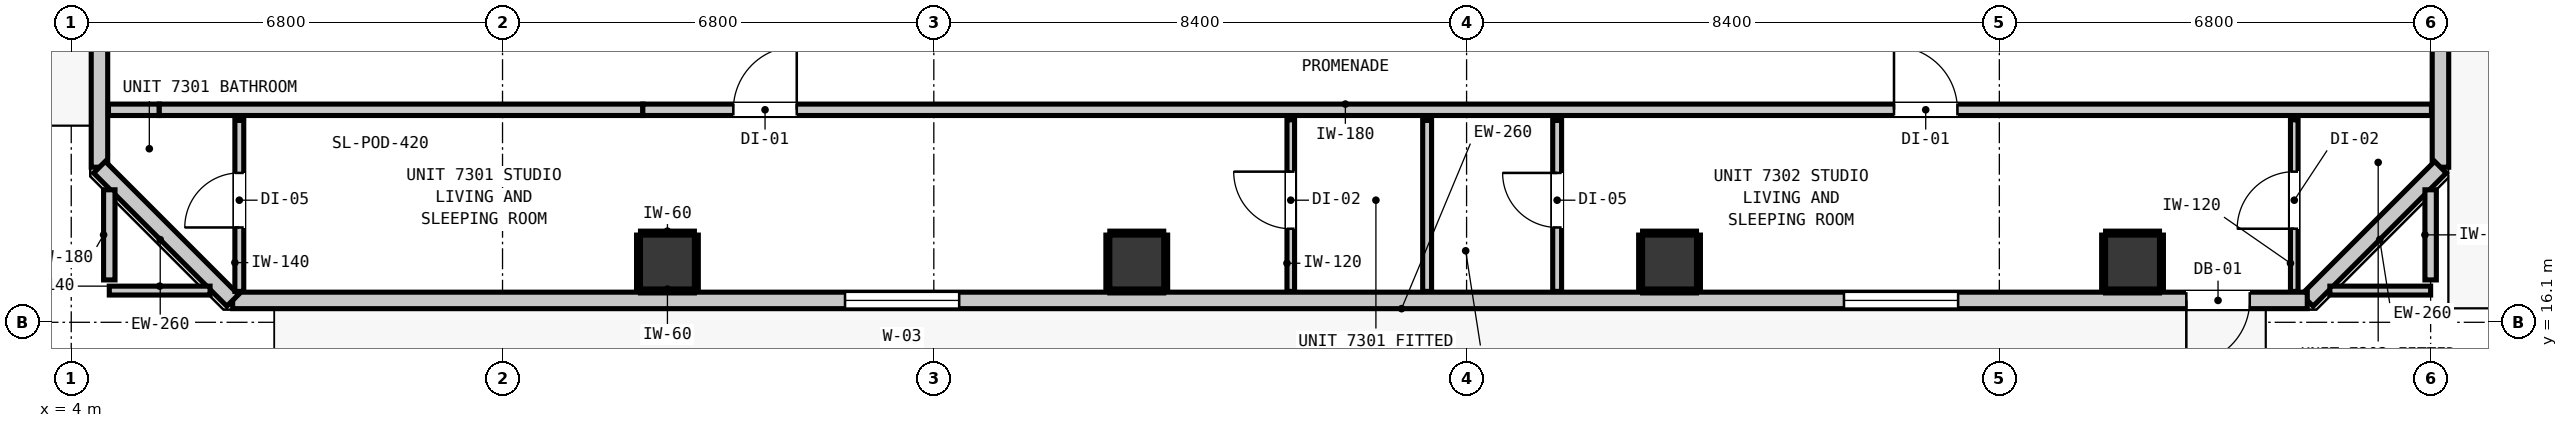
"""IFC4 building model, lengths in metres.
Left out: names, types, materials, properties, quantities, classifications, styles, units other than length and angle.
Written with IfcOpenShell. Run it as: python <this file> out.ifc"""

import sys

from ifc_helpers import new_model, si_unit, direction, frame, frame_2d, origin, origin_2d, place, context, subcontext, project, spatial, rectangle, extrude, element, fill, save


model = new_model("IFC4")
c1 = context("Model", 3, precision=1e-05, world=origin(), true_north=direction((0.0, 1.0)))
c2 = subcontext(c1, "Body", "Model", "MODEL_VIEW")
j1 = project(units=[si_unit("LENGTHUNIT", "METRE"), si_unit("PLANEANGLEUNIT", "RADIAN")], contexts=[c1])
p1 = place(None, origin())
s1 = spatial("IfcSite", under=j1, at=p1, CompositionType="ELEMENT")
p2 = place(p1, origin())
s2 = spatial("IfcBuilding", under=s1, at=p2, CompositionType="ELEMENT")
p3 = place(p2, frame((0.0, 0.0, 251.2)))
s3 = spatial("IfcBuildingStorey", under=s2, at=p3, CompositionType="ELEMENT", Elevation=251.2)
for number, where, z_axis, x_axis in (
    (1, (13.4, 17.05, -0.2), (0.0, 0.0, 1.0), (1.0, 0.0, 0.0)),
    (2, (20.8, 17.05, -0.2), (0.0, 0.0, 1.0), (1.0, 0.0, 0.0)),
    (3, (29.2, 17.05, -0.2), (0.0, 0.0, 1.0), (1.0, 0.0, 0.0)),
    (4, (36.5, 17.05, -0.2), (0.0, 0.0, 1.0), (1.0, 0.0, 0.0)),
):
    element("IfcColumn", number, at=place(p3, frame(where, z_axis=z_axis, x_axis=x_axis)), inside=s3, PredefinedType="COLUMN", context=c2, shape_type="SweptSolid", body=[
        extrude(rectangle(XDim=0.85, YDim=0.85, at=origin_2d()), origin(), (0.0, 0.0, 1.0), 3.52),
    ])
p4 = place(p3, frame((4.445, 18.545, 0.0), z_axis=(0.0, 0.0, 1.0), x_axis=(0.0, 1.0, 0.0)))
e5 = element("IfcWall", 5, at=p4, inside=s3, PredefinedType="STANDARD", context=c2, shape_type="SweptSolid", body=[
    extrude(rectangle(XDim=30.31, YDim=0.26, at=frame_2d((15.155, 0.0))), origin(), (0.0, 0.0, 1.0), 3.1),
])
p5 = place(p4, frame((4.434, 0.0, 0.0)))
e6 = element("IfcOpeningElement", 6, at=p5, cuts=e5, PredefinedType="OPENING", context=c2, shape_type="SweptSolid", body=[
    extrude(rectangle(XDim=1.0, YDim=2.15, at=frame_2d((0.5, 1.075))), frame((0.0, 0.14, 0.0), z_axis=(0.0, -1.0, 0.0), x_axis=(1.0, 0.0, 0.0)), (0.0, 0.0, 1.0), 0.28),
])
p6 = place(p4, frame((27.866, 0.0, 0.85)))
e7 = element("IfcOpeningElement", 7, at=p6, cuts=e5, PredefinedType="OPENING", context=c2, shape_type="SweptSolid", body=[
    extrude(rectangle(XDim=1.8, YDim=1.9, at=frame_2d((0.9, 0.95))), frame((0.0, 0.14, 0.0), z_axis=(0.0, -1.0, 0.0), x_axis=(1.0, 0.0, 0.0)), (0.0, 0.0, 1.0), 0.28),
])
p7 = place(p3, frame((41.355, 48.855, 0.0), z_axis=(0.0, 0.0, 1.0), x_axis=(0.0, -1.0, 0.0)))
e8 = element("IfcWall", 8, at=p7, inside=s3, PredefinedType="STANDARD", context=c2, shape_type="SweptSolid", body=[
    extrude(rectangle(XDim=30.31, YDim=0.26, at=frame_2d((15.155, 0.0))), origin(), (0.0, 0.0, 1.0), 3.1),
])
p8 = place(p7, frame((0.507, 0.0, 0.0)))
e9 = element("IfcOpeningElement", 9, at=p8, cuts=e8, PredefinedType="OPENING", context=c2, shape_type="SweptSolid", body=[
    extrude(rectangle(XDim=1.1, YDim=2.15, at=frame_2d((0.55, 1.075))), frame((0.0, 0.14, 0.0), z_axis=(0.0, -1.0, 0.0), x_axis=(1.0, 0.0, 0.0)), (0.0, 0.0, 1.0), 0.28),
])
p9 = place(p7, frame((3.406, 0.0, 0.85)))
e10 = element("IfcOpeningElement", 10, at=p9, cuts=e8, PredefinedType="OPENING", context=c2, shape_type="SweptSolid", body=[
    extrude(rectangle(XDim=1.8, YDim=1.9, at=frame_2d((0.9, 0.95))), frame((0.0, 0.14, 0.0), z_axis=(0.0, -1.0, 0.0), x_axis=(1.0, 0.0, 0.0)), (0.0, 0.0, 1.0), 0.28),
])
p10 = place(p3, frame((41.355, 18.545, 0.0), z_axis=(0.0, 0.0, 1.0), x_axis=(-0.707147883682, -0.707065676302, 0.0)))
e11 = element("IfcWall", 11, at=p10, inside=s3, PredefinedType="STANDARD", context=c2, shape_type="SweptSolid", body=[
    extrude(rectangle(XDim=2.97, YDim=0.26, at=frame_2d((1.485, 0.0))), origin(), (0.0, 0.0, 1.0), 3.1),
])
p11 = place(p3, frame((39.255, 16.445, 0.0), z_axis=(0.0, 0.0, 1.0), x_axis=(-1.0, 0.0, 0.0)))
e12 = element("IfcWall", 12, at=p11, inside=s3, PredefinedType="STANDARD", context=c2, shape_type="SweptSolid", body=[
    extrude(rectangle(XDim=32.71, YDim=0.26, at=frame_2d((16.355, 0.0))), origin(), (0.0, 0.0, 1.0), 3.1),
])
p12 = place(p11, frame((0.907, 0.0, 0.0)))
e13 = element("IfcOpeningElement", 13, at=p12, cuts=e12, PredefinedType="OPENING", context=c2, shape_type="SweptSolid", body=[
    extrude(rectangle(XDim=1.0, YDim=2.15, at=frame_2d((0.5, 1.075))), frame((0.0, 0.14, 0.0), z_axis=(0.0, -1.0, 0.0), x_axis=(1.0, 0.0, 0.0)), (0.0, 0.0, 1.0), 0.28),
])
p13 = place(p11, frame((21.255, 0.0, 0.85)))
e14 = element("IfcOpeningElement", 14, at=p13, cuts=e12, PredefinedType="OPENING", context=c2, shape_type="SweptSolid", body=[
    extrude(rectangle(XDim=1.8, YDim=1.9, at=frame_2d((0.9, 0.95))), frame((0.0, 0.14, 0.0), z_axis=(0.0, -1.0, 0.0), x_axis=(1.0, 0.0, 0.0)), (0.0, 0.0, 1.0), 0.28),
])
p14 = place(p11, frame((5.505, 0.0, 0.85)))
e15 = element("IfcOpeningElement", 15, at=p14, cuts=e12, PredefinedType="OPENING", context=c2, shape_type="SweptSolid", body=[
    extrude(rectangle(XDim=1.8, YDim=1.9, at=frame_2d((0.9, 0.95))), frame((0.0, 0.14, 0.0), z_axis=(0.0, -1.0, 0.0), x_axis=(1.0, 0.0, 0.0)), (0.0, 0.0, 1.0), 0.28),
])
p15 = place(p3, frame((6.545, 16.445, 0.0), z_axis=(0.0, 0.0, 1.0), x_axis=(-0.707106781187, 0.707106781187, 0.0)))
e16 = element("IfcWall", 16, at=p15, inside=s3, PredefinedType="STANDARD", context=c2, shape_type="SweptSolid", body=[
    extrude(rectangle(XDim=2.97, YDim=0.26, at=frame_2d((1.485, 0.0))), origin(), (0.0, 0.0, 1.0), 3.1),
])
p16 = place(p3, frame((4.587, 19.45, 0.0), z_axis=(0.0, 0.0, 1.0), x_axis=(1.0, 0.0, 0.0)))
e17 = element("IfcWall", 17, at=p16, inside=s3, PredefinedType="PARTITIONING", context=c2, shape_type="SweptSolid", body=[
    extrude(rectangle(XDim=0.801, YDim=0.18, at=frame_2d((0.4, 0.0))), origin(), (0.0, 0.0, 1.0), 3.1),
])
p17 = place(p3, frame((5.388, 19.45, 0.0), z_axis=(0.0, 0.0, 1.0), x_axis=(1.0, 0.0, 0.0)))
e18 = element("IfcWall", 18, at=p17, inside=s3, PredefinedType="PARTITIONING", context=c2, shape_type="SweptSolid", body=[
    extrude(rectangle(XDim=7.624, YDim=0.18, at=frame_2d((3.812, 0.0))), origin(), (0.0, 0.0, 1.0), 2.477),
])
p18 = place(p3, frame((13.012, 19.45, 0.0), z_axis=(0.0, 0.0, 1.0), x_axis=(1.0, 0.0, 0.0)))
e19 = element("IfcWall", 19, at=p18, inside=s3, PredefinedType="PARTITIONING", context=c2, shape_type="SweptSolid", body=[
    extrude(rectangle(XDim=28.201, YDim=0.18, at=frame_2d((14.101, 0.0))), origin(), (0.0, 0.0, 1.0), 3.1),
])
p19 = place(p18, frame((1.427, 0.0, 0.0)))
e20 = element("IfcOpeningElement", 20, at=p19, cuts=e19, PredefinedType="OPENING", context=c2, shape_type="SweptSolid", body=[
    extrude(rectangle(XDim=1.0, YDim=2.15, at=frame_2d((0.5, 1.075))), frame((0.0, 0.1, 0.0), z_axis=(0.0, -1.0, 0.0), x_axis=(1.0, 0.0, 0.0)), (0.0, 0.0, 1.0), 0.2),
])
p20 = place(p18, frame((19.727, 0.0, 0.0)))
e21 = element("IfcOpeningElement", 21, at=p20, cuts=e19, PredefinedType="OPENING", context=c2, shape_type="SweptSolid", body=[
    extrude(rectangle(XDim=1.0, YDim=2.15, at=frame_2d((0.5, 1.075))), frame((0.0, 0.1, 0.0), z_axis=(0.0, -1.0, 0.0), x_axis=(1.0, 0.0, 0.0)), (0.0, 0.0, 1.0), 0.2),
])
for number, where, z_axis, x_axis in (
    (22, (4.6, 16.6, 0.0), (0.0, 0.0, 1.0), (1.0, 0.0, 0.0)),
    (23, (39.611, 16.6, 0.0), (0.0, 0.0, 1.0), (1.0, 0.0, 0.0)),
):
    element("IfcWall", number, at=place(p3, frame(where, z_axis=z_axis, x_axis=x_axis)), inside=s3, PredefinedType="PARTITIONING", context=c2, shape_type="SweptSolid", body=[
        extrude(rectangle(XDim=1.589, YDim=0.14, at=frame_2d((0.794, 0.0))), origin(), (0.0, 0.0, 1.0), 3.1),
    ])
for number, where, z_axis, x_axis in (
    (24, (4.6, 16.768, 0.0), (0.0, 0.0, 1.0), (0.0, 1.0, 0.0)),
    (25, (41.2, 16.768, 0.0), (0.0, 0.0, 1.0), (0.0, 1.0, 0.0)),
):
    element("IfcWall", number, at=place(p3, frame(where, z_axis=z_axis, x_axis=x_axis)), inside=s3, PredefinedType="PARTITIONING", context=c2, shape_type="SweptSolid", body=[
        extrude(rectangle(XDim=1.421, YDim=0.18, at=frame_2d((0.71, 0.0))), origin(), (0.0, 0.0, 1.0), 3.1),
    ])
p21 = place(p3, frame((6.65, 16.587, 0.0), z_axis=(0.0, 0.0, 1.0), x_axis=(0.0, 1.0, 0.0)))
e26 = element("IfcWall", 26, at=p21, inside=s3, PredefinedType="PARTITIONING", context=c2, shape_type="SweptSolid", body=[
    extrude(rectangle(XDim=2.695, YDim=0.14, at=frame_2d((1.348, 0.0))), origin(), (0.0, 0.0, 1.0), 3.1),
])
p22 = place(p21, frame((1.008, 0.0, 0.0)))
e27 = element("IfcOpeningElement", 27, at=p22, cuts=e26, PredefinedType="OPENING", context=c2, shape_type="SweptSolid", body=[
    extrude(rectangle(XDim=0.86, YDim=2.02, at=frame_2d((0.43, 1.01))), frame((0.0, 0.08, 0.0), z_axis=(0.0, -1.0, 0.0), x_axis=(1.0, 0.0, 0.0)), (0.0, 0.0, 1.0), 0.16),
])
p23 = place(p3, frame((25.378, 16.587, 0.0), z_axis=(0.0, 0.0, 1.0), x_axis=(0.0, 1.0, 0.0)))
e28 = element("IfcWall", 28, at=p23, inside=s3, PredefinedType="PARTITIONING", context=c2, shape_type="SweptSolid", body=[
    extrude(rectangle(XDim=2.695, YDim=0.14, at=frame_2d((1.348, 0.0))), origin(), (0.0, 0.0, 1.0), 3.1),
])
p24 = place(p3, frame((27.428, 16.587, 0.0), z_axis=(0.0, 0.0, 1.0), x_axis=(0.0, 1.0, 0.0)))
e29 = element("IfcWall", 29, at=p24, inside=s3, PredefinedType="PARTITIONING", context=c2, shape_type="SweptSolid", body=[
    extrude(rectangle(XDim=2.695, YDim=0.14, at=frame_2d((1.348, 0.0))), origin(), (0.0, 0.0, 1.0), 3.1),
])
p25 = place(p24, frame((1.008, 0.0, 0.0)))
e30 = element("IfcOpeningElement", 30, at=p25, cuts=e29, PredefinedType="OPENING", context=c2, shape_type="SweptSolid", body=[
    extrude(rectangle(XDim=0.86, YDim=2.02, at=frame_2d((0.43, 1.01))), frame((0.0, 0.08, 0.0), z_axis=(0.0, -1.0, 0.0), x_axis=(1.0, 0.0, 0.0)), (0.0, 0.0, 1.0), 0.16),
])
p26 = place(p3, frame((23.228, 16.587, 0.0), z_axis=(0.0, 0.0, 1.0), x_axis=(0.0, 1.0, 0.0)))
e31 = element("IfcWall", 31, at=p26, inside=s3, PredefinedType="PARTITIONING", context=c2, shape_type="SweptSolid", body=[
    extrude(rectangle(XDim=2.705, YDim=0.12, at=frame_2d((1.353, 0.0))), origin(), (0.0, 0.0, 1.0), 3.1),
])
p27 = place(p26, frame((0.988, 0.0, 0.0)))
e32 = element("IfcOpeningElement", 32, at=p27, cuts=e31, PredefinedType="OPENING", context=c2, shape_type="SweptSolid", body=[
    extrude(rectangle(XDim=0.9, YDim=2.1, at=frame_2d((0.45, 1.05))), frame((0.0, 0.07, 0.0), z_axis=(0.0, -1.0, 0.0), x_axis=(1.0, 0.0, 0.0)), (0.0, 0.0, 1.0), 0.14),
])
p28 = place(p3, frame((39.05, 16.587, 0.0), z_axis=(0.0, 0.0, 1.0), x_axis=(0.0, 1.0, 0.0)))
e33 = element("IfcWall", 33, at=p28, inside=s3, PredefinedType="PARTITIONING", context=c2, shape_type="SweptSolid", body=[
    extrude(rectangle(XDim=2.705, YDim=0.12, at=frame_2d((1.353, 0.0))), origin(), (0.0, 0.0, 1.0), 3.1),
])
p29 = place(p28, frame((0.988, 0.0, 0.0)))
e34 = element("IfcOpeningElement", 34, at=p29, cuts=e33, PredefinedType="OPENING", context=c2, shape_type="SweptSolid", body=[
    extrude(rectangle(XDim=0.9, YDim=2.1, at=frame_2d((0.45, 1.05))), frame((0.0, 0.07, 0.0), z_axis=(0.0, -1.0, 0.0), x_axis=(1.0, 0.0, 0.0)), (0.0, 0.0, 1.0), 0.14),
])
for number, where, z_axis, x_axis in (
    (35, (12.975, 16.593, 0.0), (0.0, 0.0, 1.0), (1.0, 0.0, 0.0)),
    (36, (12.975, 17.507, 0.0), (0.0, 0.0, 1.0), (1.0, 0.0, 0.0)),
):
    element("IfcWall", number, at=place(p3, frame(where, z_axis=z_axis, x_axis=x_axis)), inside=s3, PredefinedType="PARTITIONING", context=c2, shape_type="SweptSolid", body=[
        extrude(rectangle(XDim=0.85, YDim=0.06, at=frame_2d((0.425, 0.0))), origin(), (0.0, 0.0, 1.0), 1.45),
    ])
for number, where, z_axis, x_axis in (
    (37, (12.943, 16.625, 0.0), (0.0, 0.0, 1.0), (0.0, 1.0, 0.0)),
    (38, (13.857, 16.625, 0.0), (0.0, 0.0, 1.0), (0.0, 1.0, 0.0)),
    (39, (20.375, 16.593, 0.0), (0.0, 0.0, 1.0), (1.0, 0.0, 0.0)),
    (40, (20.375, 17.507, 0.0), (0.0, 0.0, 1.0), (1.0, 0.0, 0.0)),
    (41, (20.343, 16.625, 0.0), (0.0, 0.0, 1.0), (0.0, 1.0, 0.0)),
    (42, (21.257, 16.625, 0.0), (0.0, 0.0, 1.0), (0.0, 1.0, 0.0)),
    (43, (28.775, 16.593, 0.0), (0.0, 0.0, 1.0), (1.0, 0.0, 0.0)),
    (44, (28.775, 17.507, 0.0), (0.0, 0.0, 1.0), (1.0, 0.0, 0.0)),
    (45, (28.743, 16.625, 0.0), (0.0, 0.0, 1.0), (0.0, 1.0, 0.0)),
    (46, (29.657, 16.625, 0.0), (0.0, 0.0, 1.0), (0.0, 1.0, 0.0)),
    (47, (36.075, 16.593, 0.0), (0.0, 0.0, 1.0), (1.0, 0.0, 0.0)),
    (48, (36.075, 17.507, 0.0), (0.0, 0.0, 1.0), (1.0, 0.0, 0.0)),
    (49, (36.043, 16.625, 0.0), (0.0, 0.0, 1.0), (0.0, 1.0, 0.0)),
    (50, (36.957, 16.625, 0.0), (0.0, 0.0, 1.0), (0.0, 1.0, 0.0)),
):
    element("IfcWall", number, at=place(p3, frame(where, z_axis=z_axis, x_axis=x_axis)), inside=s3, PredefinedType="PARTITIONING", context=c2, shape_type="SweptSolid", body=[
        extrude(rectangle(XDim=0.85, YDim=0.06, at=frame_2d((0.425, 0.0))), origin(), (0.0, 0.0, 1.0), 1.45),
    ])
p30 = place(p12, origin())
e51 = element("IfcDoor", 51, at=p30, inside=s3, OperationType="SINGLE_SWING_RIGHT", PredefinedType="DOOR", context=c2, shape_type="SweptSolid", body=[
    extrude(rectangle(XDim=1.0, YDim=2.15, at=frame_2d((0.5, 1.075))), frame((0.0, 0.025, 0.0), z_axis=(0.0, -1.0, 0.0), x_axis=(1.0, 0.0, 0.0)), (0.0, 0.0, 1.0), 0.05),
])
fill(e13, e51)
p31 = place(p13, origin())
e52 = element("IfcWindow", 52, at=p31, inside=s3, PartitioningType="SINGLE_PANEL", PredefinedType="WINDOW", context=c2, shape_type="SweptSolid", body=[
    extrude(rectangle(XDim=1.8, YDim=1.9, at=frame_2d((0.9, 0.95))), frame((0.0, 0.03, 0.0), z_axis=(0.0, -1.0, 0.0), x_axis=(1.0, 0.0, 0.0)), (0.0, 0.0, 1.0), 0.06),
])
fill(e14, e52)
p32 = place(p14, origin())
e53 = element("IfcWindow", 53, at=p32, inside=s3, PartitioningType="SINGLE_PANEL", PredefinedType="WINDOW", context=c2, shape_type="SweptSolid", body=[
    extrude(rectangle(XDim=1.8, YDim=1.9, at=frame_2d((0.9, 0.95))), frame((0.0, 0.03, 0.0), z_axis=(0.0, -1.0, 0.0), x_axis=(1.0, 0.0, 0.0)), (0.0, 0.0, 1.0), 0.06),
])
fill(e15, e53)
p33 = place(p19, origin())
e54 = element("IfcDoor", 54, at=p33, inside=s3, OperationType="SINGLE_SWING_RIGHT", PredefinedType="DOOR", context=c2, shape_type="SweptSolid", body=[
    extrude(rectangle(XDim=1.0, YDim=2.15, at=frame_2d((0.5, 1.075))), frame((0.0, 0.025, 0.0), z_axis=(0.0, -1.0, 0.0), x_axis=(1.0, 0.0, 0.0)), (0.0, 0.0, 1.0), 0.05),
])
fill(e20, e54)
p34 = place(p22, origin())
e55 = element("IfcDoor", 55, at=p34, inside=s3, OperationType="SINGLE_SWING_LEFT", PredefinedType="DOOR", context=c2, shape_type="SweptSolid", body=[
    extrude(rectangle(XDim=0.86, YDim=2.02, at=frame_2d((0.43, 1.01))), frame((0.0, 0.025, 0.0), z_axis=(0.0, -1.0, 0.0), x_axis=(1.0, 0.0, 0.0)), (0.0, 0.0, 1.0), 0.05),
])
fill(e27, e55)
p35 = place(p27, origin())
e56 = element("IfcDoor", 56, at=p35, inside=s3, OperationType="SINGLE_SWING_RIGHT", PredefinedType="DOOR", context=c2, shape_type="SweptSolid", body=[
    extrude(rectangle(XDim=0.9, YDim=2.1, at=frame_2d((0.45, 1.05))), frame((0.0, 0.025, 0.0), z_axis=(0.0, -1.0, 0.0), x_axis=(1.0, 0.0, 0.0)), (0.0, 0.0, 1.0), 0.05),
])
fill(e32, e56)
p36 = place(p20, origin())
e57 = element("IfcDoor", 57, at=p36, inside=s3, OperationType="SINGLE_SWING_LEFT", PredefinedType="DOOR", context=c2, shape_type="SweptSolid", body=[
    extrude(rectangle(XDim=1.0, YDim=2.15, at=frame_2d((0.5, 1.075))), frame((0.0, 0.025, 0.0), z_axis=(0.0, -1.0, 0.0), x_axis=(1.0, 0.0, 0.0)), (0.0, 0.0, 1.0), 0.05),
])
fill(e21, e57)
p37 = place(p25, origin())
e58 = element("IfcDoor", 58, at=p37, inside=s3, OperationType="SINGLE_SWING_RIGHT", PredefinedType="DOOR", context=c2, shape_type="SweptSolid", body=[
    extrude(rectangle(XDim=0.86, YDim=2.02, at=frame_2d((0.43, 1.01))), frame((0.0, 0.025, 0.0), z_axis=(0.0, -1.0, 0.0), x_axis=(1.0, 0.0, 0.0)), (0.0, 0.0, 1.0), 0.05),
])
fill(e30, e58)
p38 = place(p29, origin())
e59 = element("IfcDoor", 59, at=p38, inside=s3, OperationType="SINGLE_SWING_LEFT", PredefinedType="DOOR", context=c2, shape_type="SweptSolid", body=[
    extrude(rectangle(XDim=0.9, YDim=2.1, at=frame_2d((0.45, 1.05))), frame((0.0, 0.025, 0.0), z_axis=(0.0, -1.0, 0.0), x_axis=(1.0, 0.0, 0.0)), (0.0, 0.0, 1.0), 0.05),
])
fill(e34, e59)
save(model, sys.argv[1])
